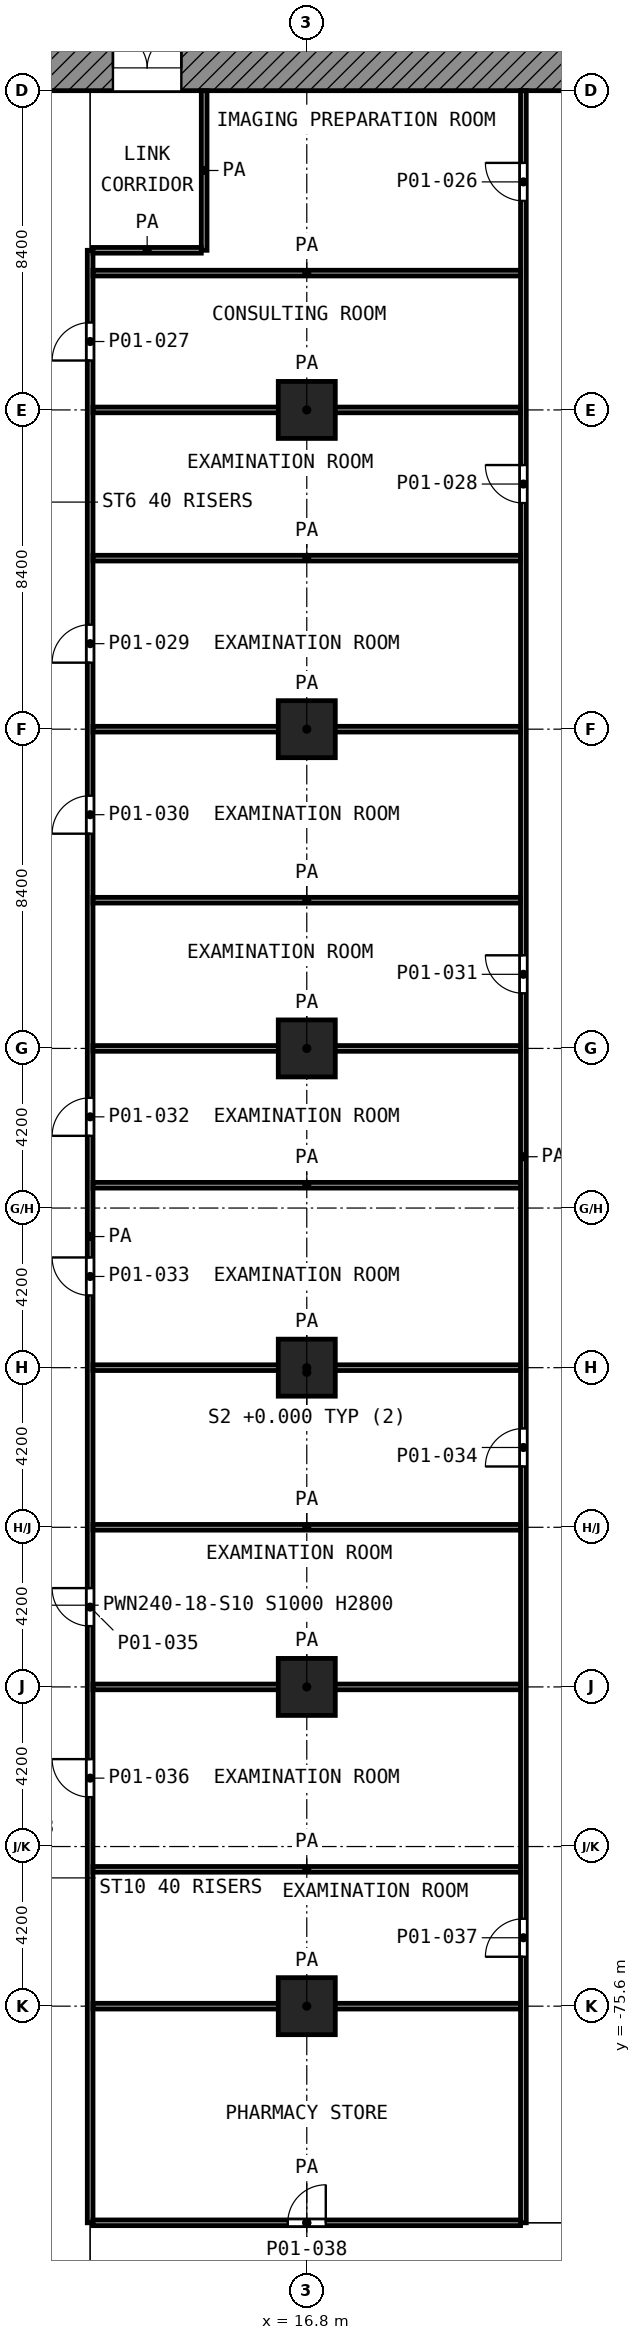
"""IFC4 building model, lengths in metres.
Left out: names, types, materials, properties, quantities, classifications, styles, units other than length and angle.
Written with IfcOpenShell. Run it as: python <this file> out.ifc"""

import sys

from ifc_helpers import new_model, si_unit, direction, frame, frame_2d, origin, origin_2d, place, context, subcontext, project, spatial, rectangle, extrude, element, fill, save


model = new_model("IFC4")
c1 = context("Model", 3, precision=1e-05, world=origin(), true_north=direction((0.0, 1.0)))
c2 = subcontext(c1, "Body", "Model", "MODEL_VIEW")
j1 = project(units=[si_unit("LENGTHUNIT", "METRE"), si_unit("PLANEANGLEUNIT", "RADIAN")], contexts=[c1])
p1 = place(None, origin())
s1 = spatial("IfcSite", under=j1, at=p1, CompositionType="ELEMENT")
p2 = place(p1, origin())
s2 = spatial("IfcBuilding", under=s1, at=p2, CompositionType="ELEMENT")
p3 = place(p2, origin())
s3 = spatial("IfcBuildingStorey", under=s2, at=p3, CompositionType="ELEMENT", Elevation=0.0)
for number, where, z_axis, x_axis in (
    (1, (16.8, -33.6, 0.0), (0.0, 0.0, 1.0), (1.0, 0.0, 0.0)),
    (2, (16.8, -42.0, 0.0), (0.0, 0.0, 1.0), (1.0, 0.0, 0.0)),
    (3, (16.8, -50.4, 0.0), (0.0, 0.0, 1.0), (1.0, 0.0, 0.0)),
    (4, (16.8, -58.8, 0.0), (0.0, 0.0, 1.0), (1.0, 0.0, 0.0)),
    (5, (16.8, -67.2, 0.0), (0.0, 0.0, 1.0), (1.0, 0.0, 0.0)),
    (6, (16.8, -75.6, 0.0), (0.0, 0.0, 1.0), (1.0, 0.0, 0.0)),
):
    element("IfcColumn", number, at=place(p3, frame(where, z_axis=z_axis, x_axis=x_axis)), inside=s3, PredefinedType="COLUMN", context=c2, shape_type="SweptSolid", body=[
        extrude(rectangle(XDim=1.5, YDim=1.5, at=origin_2d()), origin(), (0.0, 0.0, 1.0), 7.0),
    ])
p4 = place(p3, frame((5.4, -24.6, 0.0), z_axis=(0.0, 0.0, 1.0), x_axis=(1.0, 0.0, 0.0)))
e7 = element("IfcWall", 7, at=p4, inside=s3, PredefinedType="SHEAR", context=c2, shape_type="SweptSolid", body=[
    extrude(rectangle(XDim=18.6, YDim=1.2, at=frame_2d((9.3, 0.0))), origin(), (0.0, 0.0, 1.0), 6.65),
])
p5 = place(p4, frame((6.3, 0.0, 0.0)))
e8 = element("IfcOpeningElement", 8, at=p5, cuts=e7, PredefinedType="OPENING", context=c2, shape_type="SweptSolid", body=[
    extrude(rectangle(XDim=1.8, YDim=2.1, at=frame_2d((0.9, 1.05))), frame((0.0, 0.61, 0.0), z_axis=(0.0, -1.0, 0.0), x_axis=(1.0, 0.0, 0.0)), (0.0, 0.0, 1.0), 1.22),
])
p6 = place(p3, frame((11.175, -81.3, 0.0), z_axis=(0.0, 0.0, 1.0), x_axis=(1.0, 0.0, 0.0)))
e9 = element("IfcWall", 9, at=p6, inside=s3, PredefinedType="PARTITIONING", context=c2, shape_type="SweptSolid", body=[
    extrude(rectangle(XDim=11.25, YDim=0.15, at=frame_2d((5.625, 0.0))), origin(), (0.0, 0.0, 1.0), 6.65),
])
p7 = place(p6, frame((5.125, 0.0, 0.0)))
e10 = element("IfcOpeningElement", 10, at=p7, cuts=e9, PredefinedType="OPENING", context=c2, shape_type="SweptSolid", body=[
    extrude(rectangle(XDim=1.0, YDim=2.1, at=frame_2d((0.5, 1.05))), frame((0.0, 0.085, 0.0), z_axis=(0.0, -1.0, 0.0), x_axis=(1.0, 0.0, 0.0)), (0.0, 0.0, 1.0), 0.17),
])
for number, where, z_axis, x_axis in (
    (11, (11.175, -75.6, 0.0), (0.0, 0.0, 1.0), (1.0, 0.0, 0.0)),
    (12, (11.175, -72.0, 0.0), (0.0, 0.0, 1.0), (1.0, 0.0, 0.0)),
    (13, (11.175, -67.2, 0.0), (0.0, 0.0, 1.0), (1.0, 0.0, 0.0)),
    (14, (11.175, -63.0, 0.0), (0.0, 0.0, 1.0), (1.0, 0.0, 0.0)),
    (15, (11.175, -58.8, 0.0), (0.0, 0.0, 1.0), (1.0, 0.0, 0.0)),
    (16, (11.175, -54.0, 0.0), (0.0, 0.0, 1.0), (1.0, 0.0, 0.0)),
    (17, (11.175, -50.4, 0.0), (0.0, 0.0, 1.0), (1.0, 0.0, 0.0)),
    (18, (11.175, -46.5, 0.0), (0.0, 0.0, 1.0), (1.0, 0.0, 0.0)),
    (19, (11.175, -42.0, 0.0), (0.0, 0.0, 1.0), (1.0, 0.0, 0.0)),
    (20, (11.175, -37.5, 0.0), (0.0, 0.0, 1.0), (1.0, 0.0, 0.0)),
    (21, (11.175, -33.6, 0.0), (0.0, 0.0, 1.0), (1.0, 0.0, 0.0)),
    (22, (11.175, -30.0, 0.0), (0.0, 0.0, 1.0), (1.0, 0.0, 0.0)),
):
    element("IfcWall", number, at=place(p3, frame(where, z_axis=z_axis, x_axis=x_axis)), inside=s3, PredefinedType="PARTITIONING", context=c2, shape_type="SweptSolid", body=[
        extrude(rectangle(XDim=11.25, YDim=0.15, at=frame_2d((5.625, 0.0))), origin(), (0.0, 0.0, 1.0), 6.65),
    ])
p8 = place(p3, frame((11.175, -29.4, 0.0), z_axis=(0.0, 0.0, 1.0), x_axis=(1.0, 0.0, 0.0)))
e23 = element("IfcWall", 23, at=p8, inside=s3, PredefinedType="PARTITIONING", context=c2, shape_type="SweptSolid", body=[
    extrude(rectangle(XDim=2.85, YDim=0.15, at=frame_2d((1.425, 0.0))), origin(), (0.0, 0.0, 1.0), 6.65),
])
p9 = place(p3, frame((11.1, -81.3, 0.0), z_axis=(0.0, 0.0, 1.0), x_axis=(0.0, 1.0, 0.0)))
e24 = element("IfcWall", 24, at=p9, inside=s3, PredefinedType="PARTITIONING", context=c2, shape_type="SweptSolid", body=[
    extrude(rectangle(XDim=51.9, YDim=0.15, at=frame_2d((25.95, 0.0))), origin(), (0.0, 0.0, 1.0), 6.65),
])
p10 = place(p9, frame((49.0, 0.0, 0.0)))
e25 = element("IfcOpeningElement", 25, at=p10, cuts=e24, PredefinedType="OPENING", context=c2, shape_type="SweptSolid", body=[
    extrude(rectangle(XDim=1.0, YDim=2.1, at=frame_2d((0.5, 1.05))), frame((0.0, 0.085, 0.0), z_axis=(0.0, -1.0, 0.0), x_axis=(1.0, 0.0, 0.0)), (0.0, 0.0, 1.0), 0.17),
])
p11 = place(p9, frame((41.05, 0.0, 0.0)))
e26 = element("IfcOpeningElement", 26, at=p11, cuts=e24, PredefinedType="OPENING", context=c2, shape_type="SweptSolid", body=[
    extrude(rectangle(XDim=1.0, YDim=2.1, at=frame_2d((0.5, 1.05))), frame((0.0, 0.085, 0.0), z_axis=(0.0, -1.0, 0.0), x_axis=(1.0, 0.0, 0.0)), (0.0, 0.0, 1.0), 0.17),
])
p12 = place(p9, frame((36.55, 0.0, 0.0)))
e27 = element("IfcOpeningElement", 27, at=p12, cuts=e24, PredefinedType="OPENING", context=c2, shape_type="SweptSolid", body=[
    extrude(rectangle(XDim=1.0, YDim=2.1, at=frame_2d((0.5, 1.05))), frame((0.0, 0.085, 0.0), z_axis=(0.0, -1.0, 0.0), x_axis=(1.0, 0.0, 0.0)), (0.0, 0.0, 1.0), 0.17),
])
p13 = place(p9, frame((28.6, 0.0, 0.0)))
e28 = element("IfcOpeningElement", 28, at=p13, cuts=e24, PredefinedType="OPENING", context=c2, shape_type="SweptSolid", body=[
    extrude(rectangle(XDim=1.0, YDim=2.1, at=frame_2d((0.5, 1.05))), frame((0.0, 0.085, 0.0), z_axis=(0.0, -1.0, 0.0), x_axis=(1.0, 0.0, 0.0)), (0.0, 0.0, 1.0), 0.17),
])
p14 = place(p9, frame((24.4, 0.0, 0.0)))
e29 = element("IfcOpeningElement", 29, at=p14, cuts=e24, PredefinedType="OPENING", context=c2, shape_type="SweptSolid", body=[
    extrude(rectangle(XDim=1.0, YDim=2.1, at=frame_2d((0.5, 1.05))), frame((0.0, 0.085, 0.0), z_axis=(0.0, -1.0, 0.0), x_axis=(1.0, 0.0, 0.0)), (0.0, 0.0, 1.0), 0.17),
])
p15 = place(p9, frame((15.7, 0.0, 0.0)))
e30 = element("IfcOpeningElement", 30, at=p15, cuts=e24, PredefinedType="OPENING", context=c2, shape_type="SweptSolid", body=[
    extrude(rectangle(XDim=1.0, YDim=2.1, at=frame_2d((0.5, 1.05))), frame((0.0, 0.085, 0.0), z_axis=(0.0, -1.0, 0.0), x_axis=(1.0, 0.0, 0.0)), (0.0, 0.0, 1.0), 0.17),
])
p16 = place(p9, frame((11.2, 0.0, 0.0)))
e31 = element("IfcOpeningElement", 31, at=p16, cuts=e24, PredefinedType="OPENING", context=c2, shape_type="SweptSolid", body=[
    extrude(rectangle(XDim=1.0, YDim=2.1, at=frame_2d((0.5, 1.05))), frame((0.0, 0.085, 0.0), z_axis=(0.0, -1.0, 0.0), x_axis=(1.0, 0.0, 0.0)), (0.0, 0.0, 1.0), 0.17),
])
p17 = place(p3, frame((14.1, -29.4, 0.0), z_axis=(0.0, 0.0, 1.0), x_axis=(0.0, 1.0, 0.0)))
e32 = element("IfcWall", 32, at=p17, inside=s3, PredefinedType="PARTITIONING", context=c2, shape_type="SweptSolid", body=[
    extrude(rectangle(XDim=4.2, YDim=0.15, at=frame_2d((2.1, 0.0))), origin(), (0.0, 0.0, 1.0), 6.65),
])
p18 = place(p3, frame((22.5, -81.3, 0.0), z_axis=(0.0, 0.0, 1.0), x_axis=(0.0, 1.0, 0.0)))
e33 = element("IfcWall", 33, at=p18, inside=s3, PredefinedType="PARTITIONING", context=c2, shape_type="SweptSolid", body=[
    extrude(rectangle(XDim=56.1, YDim=0.15, at=frame_2d((28.05, 0.0))), origin(), (0.0, 0.0, 1.0), 6.65),
])
p19 = place(p18, frame((53.2, 0.0, 0.0)))
e34 = element("IfcOpeningElement", 34, at=p19, cuts=e33, PredefinedType="OPENING", context=c2, shape_type="SweptSolid", body=[
    extrude(rectangle(XDim=1.0, YDim=2.1, at=frame_2d((0.5, 1.05))), frame((0.0, 0.085, 0.0), z_axis=(0.0, -1.0, 0.0), x_axis=(1.0, 0.0, 0.0)), (0.0, 0.0, 1.0), 0.17),
])
p20 = place(p18, frame((45.25, 0.0, 0.0)))
e35 = element("IfcOpeningElement", 35, at=p20, cuts=e33, PredefinedType="OPENING", context=c2, shape_type="SweptSolid", body=[
    extrude(rectangle(XDim=1.0, YDim=2.1, at=frame_2d((0.5, 1.05))), frame((0.0, 0.085, 0.0), z_axis=(0.0, -1.0, 0.0), x_axis=(1.0, 0.0, 0.0)), (0.0, 0.0, 1.0), 0.17),
])
p21 = place(p18, frame((32.35, 0.0, 0.0)))
e36 = element("IfcOpeningElement", 36, at=p21, cuts=e33, PredefinedType="OPENING", context=c2, shape_type="SweptSolid", body=[
    extrude(rectangle(XDim=1.0, YDim=2.1, at=frame_2d((0.5, 1.05))), frame((0.0, 0.085, 0.0), z_axis=(0.0, -1.0, 0.0), x_axis=(1.0, 0.0, 0.0)), (0.0, 0.0, 1.0), 0.17),
])
p22 = place(p18, frame((19.9, 0.0, 0.0)))
e37 = element("IfcOpeningElement", 37, at=p22, cuts=e33, PredefinedType="OPENING", context=c2, shape_type="SweptSolid", body=[
    extrude(rectangle(XDim=1.0, YDim=2.1, at=frame_2d((0.5, 1.05))), frame((0.0, 0.085, 0.0), z_axis=(0.0, -1.0, 0.0), x_axis=(1.0, 0.0, 0.0)), (0.0, 0.0, 1.0), 0.17),
])
p23 = place(p18, frame((7.0, 0.0, 0.0)))
e38 = element("IfcOpeningElement", 38, at=p23, cuts=e33, PredefinedType="OPENING", context=c2, shape_type="SweptSolid", body=[
    extrude(rectangle(XDim=1.0, YDim=2.1, at=frame_2d((0.5, 1.05))), frame((0.0, 0.085, 0.0), z_axis=(0.0, -1.0, 0.0), x_axis=(1.0, 0.0, 0.0)), (0.0, 0.0, 1.0), 0.17),
])
p24 = place(p5, origin())
e39 = element("IfcDoor", 39, at=p24, inside=s3, OperationType="DOUBLE_DOOR_SINGLE_SWING", PredefinedType="DOOR", context=c2, shape_type="SweptSolid", body=[
    extrude(rectangle(XDim=1.8, YDim=2.1, at=frame_2d((0.9, 1.05))), frame((0.0, 0.025, 0.0), z_axis=(0.0, -1.0, 0.0), x_axis=(1.0, 0.0, 0.0)), (0.0, 0.0, 1.0), 0.05),
])
fill(e8, e39)
p25 = place(p19, origin())
e40 = element("IfcDoor", 40, at=p25, inside=s3, OperationType="SINGLE_SWING_RIGHT", PredefinedType="DOOR", context=c2, shape_type="SweptSolid", body=[
    extrude(rectangle(XDim=1.0, YDim=2.1, at=frame_2d((0.5, 1.05))), frame((0.0, 0.025, 0.0), z_axis=(0.0, -1.0, 0.0), x_axis=(1.0, 0.0, 0.0)), (0.0, 0.0, 1.0), 0.05),
])
fill(e34, e40)
p26 = place(p10, origin())
e41 = element("IfcDoor", 41, at=p26, inside=s3, OperationType="SINGLE_SWING_LEFT", PredefinedType="DOOR", context=c2, shape_type="SweptSolid", body=[
    extrude(rectangle(XDim=1.0, YDim=2.1, at=frame_2d((0.5, 1.05))), frame((0.0, 0.025, 0.0), z_axis=(0.0, -1.0, 0.0), x_axis=(1.0, 0.0, 0.0)), (0.0, 0.0, 1.0), 0.05),
])
fill(e25, e41)
p27 = place(p20, origin())
e42 = element("IfcDoor", 42, at=p27, inside=s3, OperationType="SINGLE_SWING_RIGHT", PredefinedType="DOOR", context=c2, shape_type="SweptSolid", body=[
    extrude(rectangle(XDim=1.0, YDim=2.1, at=frame_2d((0.5, 1.05))), frame((0.0, 0.025, 0.0), z_axis=(0.0, -1.0, 0.0), x_axis=(1.0, 0.0, 0.0)), (0.0, 0.0, 1.0), 0.05),
])
fill(e35, e42)
p28 = place(p11, origin())
e43 = element("IfcDoor", 43, at=p28, inside=s3, OperationType="SINGLE_SWING_LEFT", PredefinedType="DOOR", context=c2, shape_type="SweptSolid", body=[
    extrude(rectangle(XDim=1.0, YDim=2.1, at=frame_2d((0.5, 1.05))), frame((0.0, 0.025, 0.0), z_axis=(0.0, -1.0, 0.0), x_axis=(1.0, 0.0, 0.0)), (0.0, 0.0, 1.0), 0.05),
])
fill(e26, e43)
p29 = place(p12, origin())
e44 = element("IfcDoor", 44, at=p29, inside=s3, OperationType="SINGLE_SWING_LEFT", PredefinedType="DOOR", context=c2, shape_type="SweptSolid", body=[
    extrude(rectangle(XDim=1.0, YDim=2.1, at=frame_2d((0.5, 1.05))), frame((0.0, 0.025, 0.0), z_axis=(0.0, -1.0, 0.0), x_axis=(1.0, 0.0, 0.0)), (0.0, 0.0, 1.0), 0.05),
])
fill(e27, e44)
p30 = place(p21, origin())
e45 = element("IfcDoor", 45, at=p30, inside=s3, OperationType="SINGLE_SWING_RIGHT", PredefinedType="DOOR", context=c2, shape_type="SweptSolid", body=[
    extrude(rectangle(XDim=1.0, YDim=2.1, at=frame_2d((0.5, 1.05))), frame((0.0, 0.025, 0.0), z_axis=(0.0, -1.0, 0.0), x_axis=(1.0, 0.0, 0.0)), (0.0, 0.0, 1.0), 0.05),
])
fill(e36, e45)
p31 = place(p13, origin())
e46 = element("IfcDoor", 46, at=p31, inside=s3, OperationType="SINGLE_SWING_LEFT", PredefinedType="DOOR", context=c2, shape_type="SweptSolid", body=[
    extrude(rectangle(XDim=1.0, YDim=2.1, at=frame_2d((0.5, 1.05))), frame((0.0, 0.025, 0.0), z_axis=(0.0, -1.0, 0.0), x_axis=(1.0, 0.0, 0.0)), (0.0, 0.0, 1.0), 0.05),
])
fill(e28, e46)
p32 = place(p14, origin())
e47 = element("IfcDoor", 47, at=p32, inside=s3, OperationType="SINGLE_SWING_RIGHT", PredefinedType="DOOR", context=c2, shape_type="SweptSolid", body=[
    extrude(rectangle(XDim=1.0, YDim=2.1, at=frame_2d((0.5, 1.05))), frame((0.0, 0.025, 0.0), z_axis=(0.0, -1.0, 0.0), x_axis=(1.0, 0.0, 0.0)), (0.0, 0.0, 1.0), 0.05),
])
fill(e29, e47)
p33 = place(p22, origin())
e48 = element("IfcDoor", 48, at=p33, inside=s3, OperationType="SINGLE_SWING_LEFT", PredefinedType="DOOR", context=c2, shape_type="SweptSolid", body=[
    extrude(rectangle(XDim=1.0, YDim=2.1, at=frame_2d((0.5, 1.05))), frame((0.0, 0.025, 0.0), z_axis=(0.0, -1.0, 0.0), x_axis=(1.0, 0.0, 0.0)), (0.0, 0.0, 1.0), 0.05),
])
fill(e37, e48)
p34 = place(p15, origin())
e49 = element("IfcDoor", 49, at=p34, inside=s3, OperationType="SINGLE_SWING_RIGHT", PredefinedType="DOOR", context=c2, shape_type="SweptSolid", body=[
    extrude(rectangle(XDim=1.0, YDim=2.1, at=frame_2d((0.5, 1.05))), frame((0.0, 0.025, 0.0), z_axis=(0.0, -1.0, 0.0), x_axis=(1.0, 0.0, 0.0)), (0.0, 0.0, 1.0), 0.05),
])
fill(e30, e49)
p35 = place(p16, origin())
e50 = element("IfcDoor", 50, at=p35, inside=s3, OperationType="SINGLE_SWING_RIGHT", PredefinedType="DOOR", context=c2, shape_type="SweptSolid", body=[
    extrude(rectangle(XDim=1.0, YDim=2.1, at=frame_2d((0.5, 1.05))), frame((0.0, 0.025, 0.0), z_axis=(0.0, -1.0, 0.0), x_axis=(1.0, 0.0, 0.0)), (0.0, 0.0, 1.0), 0.05),
])
fill(e31, e50)
p36 = place(p23, origin())
e51 = element("IfcDoor", 51, at=p36, inside=s3, OperationType="SINGLE_SWING_LEFT", PredefinedType="DOOR", context=c2, shape_type="SweptSolid", body=[
    extrude(rectangle(XDim=1.0, YDim=2.1, at=frame_2d((0.5, 1.05))), frame((0.0, 0.025, 0.0), z_axis=(0.0, -1.0, 0.0), x_axis=(1.0, 0.0, 0.0)), (0.0, 0.0, 1.0), 0.05),
])
fill(e38, e51)
p37 = place(p7, origin())
e52 = element("IfcDoor", 52, at=p37, inside=s3, OperationType="SINGLE_SWING_RIGHT", PredefinedType="DOOR", context=c2, shape_type="SweptSolid", body=[
    extrude(rectangle(XDim=1.0, YDim=2.1, at=frame_2d((0.5, 1.05))), frame((0.0, 0.025, 0.0), z_axis=(0.0, -1.0, 0.0), x_axis=(1.0, 0.0, 0.0)), (0.0, 0.0, 1.0), 0.05),
])
fill(e10, e52)
save(model, sys.argv[1])
